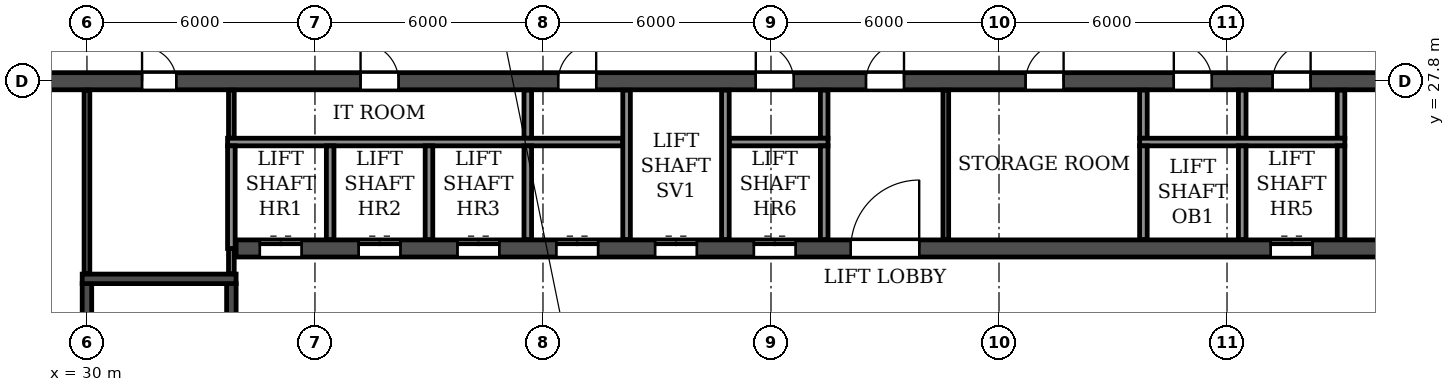
"""IFC4 building model, lengths in metres.
Left out: names, types, materials, properties, quantities, classifications, styles, units other than length and angle.
Written with IfcOpenShell. Run it as: python <this file> out.ifc"""

import sys

from ifc_helpers import new_model, si_unit, direction, frame, frame_2d, origin, place, context, subcontext, project, spatial, rectangle, extrude, element, fill, save


model = new_model("IFC4")
c1 = context("Model", 3, precision=1e-05, world=origin(), true_north=direction((0.0, 1.0)))
c2 = subcontext(c1, "Body", "Model", "MODEL_VIEW")
j1 = project(units=[si_unit("LENGTHUNIT", "METRE"), si_unit("PLANEANGLEUNIT", "RADIAN")], contexts=[c1])
p1 = place(None, origin())
s1 = spatial("IfcSite", under=j1, at=p1, CompositionType="ELEMENT")
p2 = place(p1, origin())
s2 = spatial("IfcBuilding", under=s1, at=p2, CompositionType="ELEMENT")
p3 = place(p2, frame((0.0, 0.0, 125.7)))
s3 = spatial("IfcBuildingStorey", under=s2, at=p3, CompositionType="ELEMENT", Elevation=125.7)
p4 = place(p3, frame((12.2, 27.8, 0.0), z_axis=(0.0, 0.0, 1.0), x_axis=(1.0, 0.0, 0.0)))
e1 = element("IfcWall", 1, at=p4, inside=s3, PredefinedType="SOLIDWALL", context=c2, shape_type="SweptSolid", body=[
    extrude(rectangle(XDim=77.6, YDim=0.45, at=frame_2d((38.8, 0.0))), origin(), (0.0, 0.0, 1.0), 3.07),
])
p5 = place(p4, frame((0.8, 0.0, 0.0)))
e2 = element("IfcOpeningElement", 2, at=p5, cuts=e1, PredefinedType="OPENING", context=c2, shape_type="SweptSolid", body=[
    extrude(rectangle(XDim=1.0, YDim=2.1, at=frame_2d((0.5, 1.05))), frame((0.0, 0.235, 0.0), z_axis=(0.0, -1.0, 0.0), x_axis=(1.0, 0.0, 0.0)), (0.0, 0.0, 1.0), 0.47),
])
p6 = place(p4, frame((3.8, 0.0, 0.0)))
e3 = element("IfcOpeningElement", 3, at=p6, cuts=e1, PredefinedType="OPENING", context=c2, shape_type="SweptSolid", body=[
    extrude(rectangle(XDim=1.0, YDim=2.1, at=frame_2d((0.5, 1.05))), frame((0.0, 0.235, 0.0), z_axis=(0.0, -1.0, 0.0), x_axis=(1.0, 0.0, 0.0)), (0.0, 0.0, 1.0), 0.47),
])
p7 = place(p4, frame((6.7, 0.0, 0.0)))
e4 = element("IfcOpeningElement", 4, at=p7, cuts=e1, PredefinedType="OPENING", context=c2, shape_type="SweptSolid", body=[
    extrude(rectangle(XDim=1.0, YDim=2.1, at=frame_2d((0.5, 1.05))), frame((0.0, 0.235, 0.0), z_axis=(0.0, -1.0, 0.0), x_axis=(1.0, 0.0, 0.0)), (0.0, 0.0, 1.0), 0.47),
])
p8 = place(p4, frame((10.05, 0.0, 0.0)))
e5 = element("IfcOpeningElement", 5, at=p8, cuts=e1, PredefinedType="OPENING", context=c2, shape_type="SweptSolid", body=[
    extrude(rectangle(XDim=0.9, YDim=2.1, at=frame_2d((0.45, 1.05))), frame((0.0, 0.235, 0.0), z_axis=(0.0, -1.0, 0.0), x_axis=(1.0, 0.0, 0.0)), (0.0, 0.0, 1.0), 0.47),
])
p9 = place(p4, frame((19.25, 0.0, 0.0)))
e6 = element("IfcOpeningElement", 6, at=p9, cuts=e1, PredefinedType="OPENING", context=c2, shape_type="SweptSolid", body=[
    extrude(rectangle(XDim=0.9, YDim=2.1, at=frame_2d((0.45, 1.05))), frame((0.0, 0.235, 0.0), z_axis=(0.0, -1.0, 0.0), x_axis=(1.0, 0.0, 0.0)), (0.0, 0.0, 1.0), 0.47),
])
p10 = place(p4, frame((25.0, 0.0, 0.0)))
e7 = element("IfcOpeningElement", 7, at=p10, cuts=e1, PredefinedType="OPENING", context=c2, shape_type="SweptSolid", body=[
    extrude(rectangle(XDim=1.0, YDim=2.1, at=frame_2d((0.5, 1.05))), frame((0.0, 0.235, 0.0), z_axis=(0.0, -1.0, 0.0), x_axis=(1.0, 0.0, 0.0)), (0.0, 0.0, 1.0), 0.47),
])
p11 = place(p4, frame((30.2, 0.0, 0.0)))
e8 = element("IfcOpeningElement", 8, at=p11, cuts=e1, PredefinedType="OPENING", context=c2, shape_type="SweptSolid", body=[
    extrude(rectangle(XDim=1.0, YDim=2.1, at=frame_2d((0.5, 1.05))), frame((0.0, 0.235, 0.0), z_axis=(0.0, -1.0, 0.0), x_axis=(1.0, 0.0, 0.0)), (0.0, 0.0, 1.0), 0.47),
])
p12 = place(p4, frame((35.4, 0.0, 0.0)))
e9 = element("IfcOpeningElement", 9, at=p12, cuts=e1, PredefinedType="OPENING", context=c2, shape_type="SweptSolid", body=[
    extrude(rectangle(XDim=1.0, YDim=2.1, at=frame_2d((0.5, 1.05))), frame((0.0, 0.235, 0.0), z_axis=(0.0, -1.0, 0.0), x_axis=(1.0, 0.0, 0.0)), (0.0, 0.0, 1.0), 0.47),
])
p13 = place(p4, frame((38.3, 0.0, 0.0)))
e10 = element("IfcOpeningElement", 10, at=p13, cuts=e1, PredefinedType="OPENING", context=c2, shape_type="SweptSolid", body=[
    extrude(rectangle(XDim=1.0, YDim=2.1, at=frame_2d((0.5, 1.05))), frame((0.0, 0.235, 0.0), z_axis=(0.0, -1.0, 0.0), x_axis=(1.0, 0.0, 0.0)), (0.0, 0.0, 1.0), 0.47),
])
p14 = place(p4, frame((42.5, 0.0, 0.0)))
e11 = element("IfcOpeningElement", 11, at=p14, cuts=e1, PredefinedType="OPENING", context=c2, shape_type="SweptSolid", body=[
    extrude(rectangle(XDim=1.0, YDim=2.1, at=frame_2d((0.5, 1.05))), frame((0.0, 0.235, 0.0), z_axis=(0.0, -1.0, 0.0), x_axis=(1.0, 0.0, 0.0)), (0.0, 0.0, 1.0), 0.47),
])
p15 = place(p4, frame((46.4, 0.0, 0.0)))
e12 = element("IfcOpeningElement", 12, at=p15, cuts=e1, PredefinedType="OPENING", context=c2, shape_type="SweptSolid", body=[
    extrude(rectangle(XDim=1.0, YDim=2.1, at=frame_2d((0.5, 1.05))), frame((0.0, 0.235, 0.0), z_axis=(0.0, -1.0, 0.0), x_axis=(1.0, 0.0, 0.0)), (0.0, 0.0, 1.0), 0.47),
])
p16 = place(p4, frame((49.0, 0.0, 0.0)))
e13 = element("IfcOpeningElement", 13, at=p16, cuts=e1, PredefinedType="OPENING", context=c2, shape_type="SweptSolid", body=[
    extrude(rectangle(XDim=1.0, YDim=2.1, at=frame_2d((0.5, 1.05))), frame((0.0, 0.235, 0.0), z_axis=(0.0, -1.0, 0.0), x_axis=(1.0, 0.0, 0.0)), (0.0, 0.0, 1.0), 0.47),
])
p17 = place(p4, frame((52.65, 0.0, 0.0)))
e14 = element("IfcOpeningElement", 14, at=p17, cuts=e1, PredefinedType="OPENING", context=c2, shape_type="SweptSolid", body=[
    extrude(rectangle(XDim=1.5, YDim=2.1, at=frame_2d((0.75, 1.05))), frame((0.0, 0.235, 0.0), z_axis=(0.0, -1.0, 0.0), x_axis=(1.0, 0.0, 0.0)), (0.0, 0.0, 1.0), 0.47),
])
p18 = place(p4, frame((57.45, 0.0, 0.0)))
e15 = element("IfcOpeningElement", 15, at=p18, cuts=e1, PredefinedType="OPENING", context=c2, shape_type="SweptSolid", body=[
    extrude(rectangle(XDim=0.9, YDim=2.1, at=frame_2d((0.45, 1.05))), frame((0.0, 0.235, 0.0), z_axis=(0.0, -1.0, 0.0), x_axis=(1.0, 0.0, 0.0)), (0.0, 0.0, 1.0), 0.47),
])
p19 = place(p4, frame((66.65, 0.0, 0.0)))
e16 = element("IfcOpeningElement", 16, at=p19, cuts=e1, PredefinedType="OPENING", context=c2, shape_type="SweptSolid", body=[
    extrude(rectangle(XDim=0.9, YDim=2.1, at=frame_2d((0.45, 1.05))), frame((0.0, 0.235, 0.0), z_axis=(0.0, -1.0, 0.0), x_axis=(1.0, 0.0, 0.0)), (0.0, 0.0, 1.0), 0.47),
])
p20 = place(p4, frame((69.9, 0.0, 0.0)))
e17 = element("IfcOpeningElement", 17, at=p20, cuts=e1, PredefinedType="OPENING", context=c2, shape_type="SweptSolid", body=[
    extrude(rectangle(XDim=1.0, YDim=2.1, at=frame_2d((0.5, 1.05))), frame((0.0, 0.235, 0.0), z_axis=(0.0, -1.0, 0.0), x_axis=(1.0, 0.0, 0.0)), (0.0, 0.0, 1.0), 0.47),
])
p21 = place(p4, frame((72.8, 0.0, 0.0)))
e18 = element("IfcOpeningElement", 18, at=p21, cuts=e1, PredefinedType="OPENING", context=c2, shape_type="SweptSolid", body=[
    extrude(rectangle(XDim=1.0, YDim=2.1, at=frame_2d((0.5, 1.05))), frame((0.0, 0.235, 0.0), z_axis=(0.0, -1.0, 0.0), x_axis=(1.0, 0.0, 0.0)), (0.0, 0.0, 1.0), 0.47),
])
p22 = place(p4, frame((75.8, 0.0, 0.0)))
e19 = element("IfcOpeningElement", 19, at=p22, cuts=e1, PredefinedType="OPENING", context=c2, shape_type="SweptSolid", body=[
    extrude(rectangle(XDim=1.0, YDim=2.1, at=frame_2d((0.5, 1.05))), frame((0.0, 0.235, 0.0), z_axis=(0.0, -1.0, 0.0), x_axis=(1.0, 0.0, 0.0)), (0.0, 0.0, 1.0), 0.47),
])
p23 = place(p3, frame((33.925, 23.4, 0.0), z_axis=(0.0, 0.0, 1.0), x_axis=(1.0, 0.0, 0.0)))
e20 = element("IfcWall", 20, at=p23, inside=s3, PredefinedType="SOLIDWALL", context=c2, shape_type="SweptSolid", body=[
    extrude(rectangle(XDim=34.15, YDim=0.45, at=frame_2d((17.075, 0.0))), origin(), (0.0, 0.0, 1.0), 3.07),
])
p24 = place(p23, frame((16.175, 0.0, 0.0)))
e21 = element("IfcOpeningElement", 21, at=p24, cuts=e20, PredefinedType="OPENING", context=c2, shape_type="SweptSolid", body=[
    extrude(rectangle(XDim=1.8, YDim=2.1, at=frame_2d((0.9, 1.05))), frame((0.0, 0.235, 0.0), z_axis=(0.0, -1.0, 0.0), x_axis=(1.0, 0.0, 0.0)), (0.0, 0.0, 1.0), 0.47),
])
p25 = place(p23, frame((0.625, 0.0, 0.0)))
e22 = element("IfcOpeningElement", 22, at=p25, cuts=e20, PredefinedType="OPENING", context=c2, shape_type="SweptSolid", body=[
    extrude(rectangle(XDim=1.1, YDim=2.1, at=frame_2d((0.55, 1.05))), frame((0.0, 0.235, 0.0), z_axis=(0.0, -1.0, 0.0), x_axis=(1.0, 0.0, 0.0)), (0.0, 0.0, 1.0), 0.47),
])
p26 = place(p23, frame((3.225, 0.0, 0.0)))
e23 = element("IfcOpeningElement", 23, at=p26, cuts=e20, PredefinedType="OPENING", context=c2, shape_type="SweptSolid", body=[
    extrude(rectangle(XDim=1.1, YDim=2.1, at=frame_2d((0.55, 1.05))), frame((0.0, 0.235, 0.0), z_axis=(0.0, -1.0, 0.0), x_axis=(1.0, 0.0, 0.0)), (0.0, 0.0, 1.0), 0.47),
])
p27 = place(p23, frame((5.825, 0.0, 0.0)))
e24 = element("IfcOpeningElement", 24, at=p27, cuts=e20, PredefinedType="OPENING", context=c2, shape_type="SweptSolid", body=[
    extrude(rectangle(XDim=1.1, YDim=2.1, at=frame_2d((0.55, 1.05))), frame((0.0, 0.235, 0.0), z_axis=(0.0, -1.0, 0.0), x_axis=(1.0, 0.0, 0.0)), (0.0, 0.0, 1.0), 0.47),
])
p28 = place(p23, frame((8.425, 0.0, 0.0)))
e25 = element("IfcOpeningElement", 25, at=p28, cuts=e20, PredefinedType="OPENING", context=c2, shape_type="SweptSolid", body=[
    extrude(rectangle(XDim=1.1, YDim=2.1, at=frame_2d((0.55, 1.05))), frame((0.0, 0.235, 0.0), z_axis=(0.0, -1.0, 0.0), x_axis=(1.0, 0.0, 0.0)), (0.0, 0.0, 1.0), 0.47),
])
p29 = place(p23, frame((11.025, 0.0, 0.0)))
e26 = element("IfcOpeningElement", 26, at=p29, cuts=e20, PredefinedType="OPENING", context=c2, shape_type="SweptSolid", body=[
    extrude(rectangle(XDim=1.1, YDim=2.1, at=frame_2d((0.55, 1.05))), frame((0.0, 0.235, 0.0), z_axis=(0.0, -1.0, 0.0), x_axis=(1.0, 0.0, 0.0)), (0.0, 0.0, 1.0), 0.47),
])
p30 = place(p23, frame((13.625, 0.0, 0.0)))
e27 = element("IfcOpeningElement", 27, at=p30, cuts=e20, PredefinedType="OPENING", context=c2, shape_type="SweptSolid", body=[
    extrude(rectangle(XDim=1.1, YDim=2.1, at=frame_2d((0.55, 1.05))), frame((0.0, 0.235, 0.0), z_axis=(0.0, -1.0, 0.0), x_axis=(1.0, 0.0, 0.0)), (0.0, 0.0, 1.0), 0.47),
])
p31 = place(p23, frame((27.225, 0.0, 0.0)))
e28 = element("IfcOpeningElement", 28, at=p31, cuts=e20, PredefinedType="OPENING", context=c2, shape_type="SweptSolid", body=[
    extrude(rectangle(XDim=1.1, YDim=2.1, at=frame_2d((0.55, 1.05))), frame((0.0, 0.235, 0.0), z_axis=(0.0, -1.0, 0.0), x_axis=(1.0, 0.0, 0.0)), (0.0, 0.0, 1.0), 0.47),
])
p32 = place(p3, frame((30.0, 14.825, 0.0), z_axis=(0.0, 0.0, 1.0), x_axis=(0.0, 1.0, 0.0)))
e29 = element("IfcWall", 29, at=p32, inside=s3, PredefinedType="SOLIDWALL", context=c2, shape_type="SweptSolid", body=[
    extrude(rectangle(XDim=7.65, YDim=0.25, at=frame_2d((3.825, 0.0))), origin(), (0.0, 0.0, 1.0), 3.07),
])
p33 = place(p3, frame((33.8, 14.825, 0.0), z_axis=(0.0, 0.0, 1.0), x_axis=(0.0, 1.0, 0.0)))
e30 = element("IfcWall", 30, at=p33, inside=s3, PredefinedType="SOLIDWALL", context=c2, shape_type="SweptSolid", body=[
    extrude(rectangle(XDim=7.65, YDim=0.25, at=frame_2d((3.825, 0.0))), origin(), (0.0, 0.0, 1.0), 3.07),
])
p34 = place(p33, frame((0.475, 0.0, 0.0)))
e31 = element("IfcOpeningElement", 31, at=p34, cuts=e30, PredefinedType="OPENING", context=c2, shape_type="SweptSolid", body=[
    extrude(rectangle(XDim=1.0, YDim=2.1, at=frame_2d((0.5, 1.05))), frame((0.0, 0.135, 0.0), z_axis=(0.0, -1.0, 0.0), x_axis=(1.0, 0.0, 0.0)), (0.0, 0.0, 1.0), 0.27),
])
p35 = place(p3, frame((29.875, 22.6, 0.0), z_axis=(0.0, 0.0, 1.0), x_axis=(1.0, 0.0, 0.0)))
e32 = element("IfcWall", 32, at=p35, inside=s3, PredefinedType="SOLIDWALL", context=c2, shape_type="SweptSolid", body=[
    extrude(rectangle(XDim=4.05, YDim=0.25, at=frame_2d((2.025, 0.0))), origin(), (0.0, 0.0, 1.0), 3.07),
])
p36 = place(p3, frame((52.6, 23.635, 0.0), z_axis=(0.0, 0.0, 1.0), x_axis=(0.0, 1.0, 0.0)))
e33 = element("IfcWall", 33, at=p36, inside=s3, PredefinedType="PARTITIONING", context=c2, shape_type="SweptSolid", body=[
    extrude(rectangle(XDim=3.93, YDim=0.15, at=frame_2d((1.965, 0.0))), origin(), (0.0, 0.0, 1.0), 3.07),
])
for number, where, z_axis, x_axis in (
    (34, (41.6, 26.3, 0.0), (0.0, 0.0, 1.0), (0.0, 1.0, 0.0)),
    (35, (49.4, 26.3, 0.0), (0.0, 0.0, 1.0), (0.0, 1.0, 0.0)),
    (36, (57.8, 26.3, 0.0), (0.0, 0.0, 1.0), (0.0, 1.0, 0.0)),
    (37, (60.4, 26.3, 0.0), (0.0, 0.0, 1.0), (0.0, 1.0, 0.0)),
    (38, (63.0, 26.3, 0.0), (0.0, 0.0, 1.0), (0.0, 1.0, 0.0)),
):
    element("IfcWall", number, at=place(p3, frame(where, z_axis=z_axis, x_axis=x_axis)), inside=s3, PredefinedType="PARTITIONING", context=c2, shape_type="SweptSolid", body=[
        extrude(rectangle(XDim=1.265, YDim=0.2, at=frame_2d((0.632, 0.0))), origin(), (0.0, 0.0, 1.0), 3.07),
    ])
p37 = place(p3, frame((30.0, 22.735, 0.0), z_axis=(0.0, 0.0, 1.0), x_axis=(0.0, 1.0, 0.0)))
e39 = element("IfcWall", 39, at=p37, inside=s3, PredefinedType="PARTITIONING", context=c2, shape_type="SweptSolid", body=[
    extrude(rectangle(XDim=4.83, YDim=0.15, at=frame_2d((2.415, 0.0))), origin(), (0.0, 0.0, 1.0), 3.07),
])
p38 = place(p3, frame((33.8, 22.735, 0.0), z_axis=(0.0, 0.0, 1.0), x_axis=(0.0, 1.0, 0.0)))
e40 = element("IfcWall", 40, at=p38, inside=s3, PredefinedType="PARTITIONING", context=c2, shape_type="SweptSolid", body=[
    extrude(rectangle(XDim=0.665, YDim=0.15, at=frame_2d((0.333, 0.0))), origin(), (0.0, 0.0, 1.0), 3.07),
])
p39 = place(p3, frame((33.8, 26.3, 0.0), z_axis=(0.0, 0.0, 1.0), x_axis=(0.0, 1.0, 0.0)))
e41 = element("IfcWall", 41, at=p39, inside=s3, PredefinedType="PARTITIONING", context=c2, shape_type="SweptSolid", body=[
    extrude(rectangle(XDim=1.265, YDim=0.15, at=frame_2d((0.632, 0.0))), origin(), (0.0, 0.0, 1.0), 3.07),
])
p40 = place(p3, frame((33.7, 26.2, 0.0), z_axis=(0.0, 0.0, 1.0), x_axis=(1.0, 0.0, 0.0)))
e42 = element("IfcWall", 42, at=p40, inside=s3, PredefinedType="PARTITIONING", context=c2, shape_type="SweptSolid", body=[
    extrude(rectangle(XDim=10.4, YDim=0.2, at=frame_2d((5.2, 0.0))), origin(), (0.0, 0.0, 1.0), 3.07),
])
p41 = place(p3, frame((46.9, 26.2, 0.0), z_axis=(0.0, 0.0, 1.0), x_axis=(1.0, 0.0, 0.0)))
e43 = element("IfcWall", 43, at=p41, inside=s3, PredefinedType="PARTITIONING", context=c2, shape_type="SweptSolid", body=[
    extrude(rectangle(XDim=2.6, YDim=0.2, at=frame_2d((1.3, 0.0))), origin(), (0.0, 0.0, 1.0), 3.07),
])
p42 = place(p3, frame((57.7, 26.2, 0.0), z_axis=(0.0, 0.0, 1.0), x_axis=(1.0, 0.0, 0.0)))
e44 = element("IfcWall", 44, at=p42, inside=s3, PredefinedType="PARTITIONING", context=c2, shape_type="SweptSolid", body=[
    extrude(rectangle(XDim=5.4, YDim=0.2, at=frame_2d((2.7, 0.0))), origin(), (0.0, 0.0, 1.0), 3.07),
])
p43 = place(p3, frame((33.8, 23.4, 0.0), z_axis=(0.0, 0.0, 1.0), x_axis=(0.0, 1.0, 0.0)))
e45 = element("IfcWall", 45, at=p43, inside=s3, PredefinedType="PARTITIONING", context=c2, shape_type="SweptSolid", body=[
    extrude(rectangle(XDim=2.7, YDim=0.2, at=frame_2d((1.35, 0.0))), origin(), (0.0, 0.0, 1.0), 3.07),
])
for number, where, z_axis, x_axis in (
    (46, (36.4, 23.635, 0.0), (0.0, 0.0, 1.0), (0.0, 1.0, 0.0)),
    (47, (39.0, 23.635, 0.0), (0.0, 0.0, 1.0), (0.0, 1.0, 0.0)),
    (48, (41.6, 23.635, 0.0), (0.0, 0.0, 1.0), (0.0, 1.0, 0.0)),
):
    element("IfcWall", number, at=place(p3, frame(where, z_axis=z_axis, x_axis=x_axis)), inside=s3, PredefinedType="PARTITIONING", context=c2, shape_type="SweptSolid", body=[
        extrude(rectangle(XDim=2.465, YDim=0.2, at=frame_2d((1.232, 0.0))), origin(), (0.0, 0.0, 1.0), 3.07),
    ])
for number, where, z_axis, x_axis in (
    (49, (44.2, 23.635, 0.0), (0.0, 0.0, 1.0), (0.0, 1.0, 0.0)),
    (50, (46.8, 23.635, 0.0), (0.0, 0.0, 1.0), (0.0, 1.0, 0.0)),
):
    element("IfcWall", number, at=place(p3, frame(where, z_axis=z_axis, x_axis=x_axis)), inside=s3, PredefinedType="PARTITIONING", context=c2, shape_type="SweptSolid", body=[
        extrude(rectangle(XDim=3.93, YDim=0.2, at=frame_2d((1.965, 0.0))), origin(), (0.0, 0.0, 1.0), 3.07),
    ])
for number, where, z_axis, x_axis in (
    (51, (49.4, 23.635, 0.0), (0.0, 0.0, 1.0), (0.0, 1.0, 0.0)),
    (52, (57.8, 23.635, 0.0), (0.0, 0.0, 1.0), (0.0, 1.0, 0.0)),
    (53, (60.4, 23.635, 0.0), (0.0, 0.0, 1.0), (0.0, 1.0, 0.0)),
    (54, (63.0, 23.635, 0.0), (0.0, 0.0, 1.0), (0.0, 1.0, 0.0)),
):
    element("IfcWall", number, at=place(p3, frame(where, z_axis=z_axis, x_axis=x_axis)), inside=s3, PredefinedType="PARTITIONING", context=c2, shape_type="SweptSolid", body=[
        extrude(rectangle(XDim=2.465, YDim=0.2, at=frame_2d((1.232, 0.0))), origin(), (0.0, 0.0, 1.0), 3.07),
    ])
p44 = place(p9, origin())
e55 = element("IfcDoor", 55, at=p44, inside=s3, OperationType="SINGLE_SWING_LEFT", PredefinedType="DOOR", context=c2, shape_type="SweptSolid", body=[
    extrude(rectangle(XDim=0.9, YDim=2.1, at=frame_2d((0.45, 1.05))), frame((0.0, 0.025, 0.0), z_axis=(0.0, -1.0, 0.0), x_axis=(1.0, 0.0, 0.0)), (0.0, 0.0, 1.0), 0.05),
])
fill(e6, e55)
p45 = place(p10, origin())
e56 = element("IfcDoor", 56, at=p45, inside=s3, OperationType="SINGLE_SWING_LEFT", PredefinedType="DOOR", context=c2, shape_type="SweptSolid", body=[
    extrude(rectangle(XDim=1.0, YDim=2.1, at=frame_2d((0.5, 1.05))), frame((0.0, 0.025, 0.0), z_axis=(0.0, -1.0, 0.0), x_axis=(1.0, 0.0, 0.0)), (0.0, 0.0, 1.0), 0.05),
])
fill(e7, e56)
p46 = place(p11, origin())
e57 = element("IfcDoor", 57, at=p46, inside=s3, OperationType="SINGLE_SWING_RIGHT", PredefinedType="DOOR", context=c2, shape_type="SweptSolid", body=[
    extrude(rectangle(XDim=1.0, YDim=2.1, at=frame_2d((0.5, 1.05))), frame((0.0, 0.025, 0.0), z_axis=(0.0, -1.0, 0.0), x_axis=(1.0, 0.0, 0.0)), (0.0, 0.0, 1.0), 0.05),
])
fill(e8, e57)
p47 = place(p12, origin())
e58 = element("IfcDoor", 58, at=p47, inside=s3, OperationType="SINGLE_SWING_LEFT", PredefinedType="DOOR", context=c2, shape_type="SweptSolid", body=[
    extrude(rectangle(XDim=1.0, YDim=2.1, at=frame_2d((0.5, 1.05))), frame((0.0, 0.025, 0.0), z_axis=(0.0, -1.0, 0.0), x_axis=(1.0, 0.0, 0.0)), (0.0, 0.0, 1.0), 0.05),
])
fill(e9, e58)
p48 = place(p13, origin())
e59 = element("IfcDoor", 59, at=p48, inside=s3, OperationType="SINGLE_SWING_RIGHT", PredefinedType="DOOR", context=c2, shape_type="SweptSolid", body=[
    extrude(rectangle(XDim=1.0, YDim=2.1, at=frame_2d((0.5, 1.05))), frame((0.0, 0.025, 0.0), z_axis=(0.0, -1.0, 0.0), x_axis=(1.0, 0.0, 0.0)), (0.0, 0.0, 1.0), 0.05),
])
fill(e10, e59)
p49 = place(p14, origin())
e60 = element("IfcDoor", 60, at=p49, inside=s3, OperationType="SINGLE_SWING_RIGHT", PredefinedType="DOOR", context=c2, shape_type="SweptSolid", body=[
    extrude(rectangle(XDim=1.0, YDim=2.1, at=frame_2d((0.5, 1.05))), frame((0.0, 0.025, 0.0), z_axis=(0.0, -1.0, 0.0), x_axis=(1.0, 0.0, 0.0)), (0.0, 0.0, 1.0), 0.05),
])
fill(e11, e60)
p50 = place(p15, origin())
e61 = element("IfcDoor", 61, at=p50, inside=s3, OperationType="SINGLE_SWING_LEFT", PredefinedType="DOOR", context=c2, shape_type="SweptSolid", body=[
    extrude(rectangle(XDim=1.0, YDim=2.1, at=frame_2d((0.5, 1.05))), frame((0.0, 0.025, 0.0), z_axis=(0.0, -1.0, 0.0), x_axis=(1.0, 0.0, 0.0)), (0.0, 0.0, 1.0), 0.05),
])
fill(e12, e61)
p51 = place(p16, origin())
e62 = element("IfcDoor", 62, at=p51, inside=s3, OperationType="SINGLE_SWING_RIGHT", PredefinedType="DOOR", context=c2, shape_type="SweptSolid", body=[
    extrude(rectangle(XDim=1.0, YDim=2.1, at=frame_2d((0.5, 1.05))), frame((0.0, 0.025, 0.0), z_axis=(0.0, -1.0, 0.0), x_axis=(1.0, 0.0, 0.0)), (0.0, 0.0, 1.0), 0.05),
])
fill(e13, e62)
p52 = place(p24, origin())
e63 = element("IfcDoor", 63, at=p52, inside=s3, OperationType="DOUBLE_DOOR_SINGLE_SWING", PredefinedType="DOOR", context=c2, shape_type="SweptSolid", body=[
    extrude(rectangle(XDim=1.8, YDim=2.1, at=frame_2d((0.9, 1.05))), frame((0.0, 0.025, 0.0), z_axis=(0.0, -1.0, 0.0), x_axis=(1.0, 0.0, 0.0)), (0.0, 0.0, 1.0), 0.05),
])
fill(e21, e63)
p53 = place(p25, origin())
e64 = element("IfcDoor", 64, at=p53, inside=s3, OperationType="DOUBLE_DOOR_SLIDING", PredefinedType="DOOR", context=c2, shape_type="SweptSolid", body=[
    extrude(rectangle(XDim=1.1, YDim=2.1, at=frame_2d((0.55, 1.05))), frame((0.0, 0.025, 0.0), z_axis=(0.0, -1.0, 0.0), x_axis=(1.0, 0.0, 0.0)), (0.0, 0.0, 1.0), 0.05),
])
fill(e22, e64)
p54 = place(p26, origin())
e65 = element("IfcDoor", 65, at=p54, inside=s3, OperationType="DOUBLE_DOOR_SLIDING", PredefinedType="DOOR", context=c2, shape_type="SweptSolid", body=[
    extrude(rectangle(XDim=1.1, YDim=2.1, at=frame_2d((0.55, 1.05))), frame((0.0, 0.025, 0.0), z_axis=(0.0, -1.0, 0.0), x_axis=(1.0, 0.0, 0.0)), (0.0, 0.0, 1.0), 0.05),
])
fill(e23, e65)
p55 = place(p27, origin())
e66 = element("IfcDoor", 66, at=p55, inside=s3, OperationType="DOUBLE_DOOR_SLIDING", PredefinedType="DOOR", context=c2, shape_type="SweptSolid", body=[
    extrude(rectangle(XDim=1.1, YDim=2.1, at=frame_2d((0.55, 1.05))), frame((0.0, 0.025, 0.0), z_axis=(0.0, -1.0, 0.0), x_axis=(1.0, 0.0, 0.0)), (0.0, 0.0, 1.0), 0.05),
])
fill(e24, e66)
p56 = place(p28, origin())
e67 = element("IfcDoor", 67, at=p56, inside=s3, OperationType="DOUBLE_DOOR_SLIDING", PredefinedType="DOOR", context=c2, shape_type="SweptSolid", body=[
    extrude(rectangle(XDim=1.1, YDim=2.1, at=frame_2d((0.55, 1.05))), frame((0.0, 0.025, 0.0), z_axis=(0.0, -1.0, 0.0), x_axis=(1.0, 0.0, 0.0)), (0.0, 0.0, 1.0), 0.05),
])
fill(e25, e67)
p57 = place(p29, origin())
e68 = element("IfcDoor", 68, at=p57, inside=s3, OperationType="DOUBLE_DOOR_SLIDING", PredefinedType="DOOR", context=c2, shape_type="SweptSolid", body=[
    extrude(rectangle(XDim=1.1, YDim=2.1, at=frame_2d((0.55, 1.05))), frame((0.0, 0.025, 0.0), z_axis=(0.0, -1.0, 0.0), x_axis=(1.0, 0.0, 0.0)), (0.0, 0.0, 1.0), 0.05),
])
fill(e26, e68)
p58 = place(p30, origin())
e69 = element("IfcDoor", 69, at=p58, inside=s3, OperationType="DOUBLE_DOOR_SLIDING", PredefinedType="DOOR", context=c2, shape_type="SweptSolid", body=[
    extrude(rectangle(XDim=1.1, YDim=2.1, at=frame_2d((0.55, 1.05))), frame((0.0, 0.025, 0.0), z_axis=(0.0, -1.0, 0.0), x_axis=(1.0, 0.0, 0.0)), (0.0, 0.0, 1.0), 0.05),
])
fill(e27, e69)
p59 = place(p31, origin())
e70 = element("IfcDoor", 70, at=p59, inside=s3, OperationType="DOUBLE_DOOR_SLIDING", PredefinedType="DOOR", context=c2, shape_type="SweptSolid", body=[
    extrude(rectangle(XDim=1.1, YDim=2.1, at=frame_2d((0.55, 1.05))), frame((0.0, 0.025, 0.0), z_axis=(0.0, -1.0, 0.0), x_axis=(1.0, 0.0, 0.0)), (0.0, 0.0, 1.0), 0.05),
])
fill(e28, e70)
save(model, sys.argv[1])
